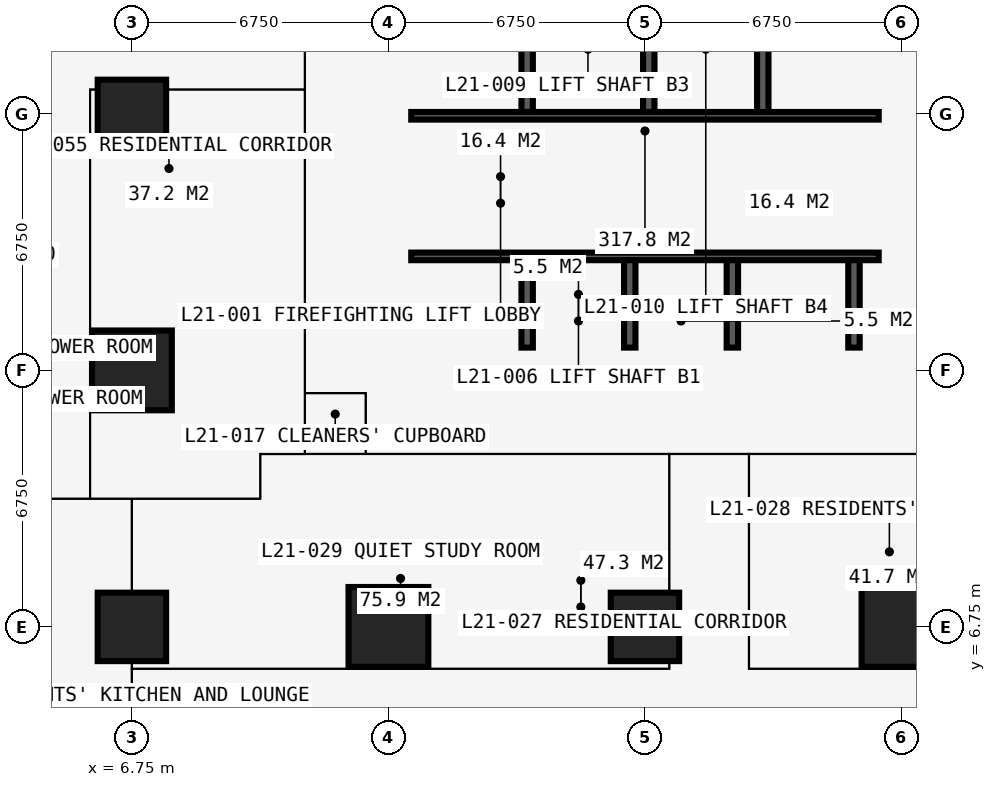
"""IFC4 building model, lengths in metres.
Left out: names, types, materials, properties, quantities, classifications, styles, units other than length and angle.
Written with IfcOpenShell. Run it as: python <this file> out.ifc"""

import sys

from ifc_helpers import new_model, si_unit, direction, frame, frame_2d, origin, origin_2d, place, context, subcontext, project, spatial, rectangle, extrude, element, fill, save


model = new_model("IFC4")
c1 = context("Model", 3, precision=1e-05, world=origin(), true_north=direction((0.0, 1.0)))
c2 = subcontext(c1, "Body", "Model", "MODEL_VIEW")
j1 = project(units=[si_unit("LENGTHUNIT", "METRE"), si_unit("PLANEANGLEUNIT", "RADIAN")], contexts=[c1])
p1 = place(None, origin())
s1 = spatial("IfcSite", under=j1, at=p1, CompositionType="ELEMENT")
p2 = place(p1, origin())
s2 = spatial("IfcBuilding", under=s1, at=p2, CompositionType="ELEMENT")
p3 = place(p2, frame((0.0, 0.0, 80.1)))
s3 = spatial("IfcBuildingStorey", under=s2, at=p3, CompositionType="ELEMENT", Elevation=80.1)
p4 = place(p3, frame((6.75, 6.75, 0.0), z_axis=(0.0, 0.0, 1.0), x_axis=(1.0, 0.0, 0.0)))
e1 = element("IfcColumn", 1, at=p4, inside=s3, PredefinedType="COLUMN", context=c2, shape_type="SweptSolid", body=[
    extrude(rectangle(XDim=1.8, YDim=1.8, at=origin_2d()), origin(), (0.0, 0.0, 1.0), 3.6),
])
p5 = place(p3, frame((6.75, 13.5, 0.0), z_axis=(0.0, 0.0, 1.0), x_axis=(1.0, 0.0, 0.0)))
e2 = element("IfcColumn", 2, at=p5, inside=s3, PredefinedType="COLUMN", context=c2, shape_type="SweptSolid", body=[
    extrude(rectangle(XDim=2.1, YDim=2.1, at=origin_2d()), origin(), (0.0, 0.0, 1.0), 3.6),
])
p6 = place(p3, frame((6.75, 20.25, 0.0), z_axis=(0.0, 0.0, 1.0), x_axis=(1.0, 0.0, 0.0)))
e3 = element("IfcColumn", 3, at=p6, inside=s3, PredefinedType="COLUMN", context=c2, shape_type="SweptSolid", body=[
    extrude(rectangle(XDim=1.8, YDim=1.8, at=origin_2d()), origin(), (0.0, 0.0, 1.0), 3.6),
])
p7 = place(p3, frame((13.5, 6.75, 0.0), z_axis=(0.0, 0.0, 1.0), x_axis=(1.0, 0.0, 0.0)))
e4 = element("IfcColumn", 4, at=p7, inside=s3, PredefinedType="COLUMN", context=c2, shape_type="SweptSolid", body=[
    extrude(rectangle(XDim=2.1, YDim=2.1, at=origin_2d()), origin(), (0.0, 0.0, 1.0), 3.6),
])
p8 = place(p3, frame((20.25, 6.75, 0.0), z_axis=(0.0, 0.0, 1.0), x_axis=(1.0, 0.0, 0.0)))
e5 = element("IfcColumn", 5, at=p8, inside=s3, PredefinedType="COLUMN", context=c2, shape_type="SweptSolid", body=[
    extrude(rectangle(XDim=1.8, YDim=1.8, at=origin_2d()), origin(), (0.0, 0.0, 1.0), 3.6),
])
p9 = place(p3, frame((27.0, 6.75, 0.0), z_axis=(0.0, 0.0, 1.0), x_axis=(1.0, 0.0, 0.0)))
e6 = element("IfcColumn", 6, at=p9, inside=s3, PredefinedType="COLUMN", context=c2, shape_type="SweptSolid", body=[
    extrude(rectangle(XDim=2.1, YDim=2.1, at=origin_2d()), origin(), (0.0, 0.0, 1.0), 3.6),
])
p10 = place(p3, frame((12.9, 13.5, 0.0), z_axis=(0.0, 0.0, 1.0), x_axis=(1.0, 0.0, 0.0)))
e7 = element("IfcWall", 7, at=p10, inside=s3, PredefinedType="SHEAR", context=c2, shape_type="SweptSolid", body=[
    extrude(rectangle(XDim=14.7, YDim=1.2, at=frame_2d((7.35, 0.0))), origin(), (0.0, 0.0, 1.0), 3.6),
])
p11 = place(p3, frame((27.0, 14.1, 0.0), z_axis=(0.0, 0.0, 1.0), x_axis=(0.0, 1.0, 0.0)))
e8 = element("IfcWall", 8, at=p11, inside=s3, PredefinedType="SHEAR", context=c2, shape_type="SweptSolid", body=[
    extrude(rectangle(XDim=12.3, YDim=1.2, at=frame_2d((6.15, 0.0))), origin(), (0.0, 0.0, 1.0), 3.6),
])
p12 = place(p11, frame((3.65, 0.0, 0.0)))
e9 = element("IfcOpeningElement", 9, at=p12, cuts=e8, PredefinedType="OPENING", context=c2, shape_type="SweptSolid", body=[
    extrude(rectangle(XDim=1.2, YDim=2.2, at=frame_2d((0.6, 1.1))), frame((0.0, 0.61, 0.0), z_axis=(0.0, -1.0, 0.0), x_axis=(1.0, 0.0, 0.0)), (0.0, 0.0, 1.0), 1.22),
])
p13 = place(p3, frame((13.5, 26.4, 0.0), z_axis=(0.0, 0.0, 1.0), x_axis=(0.0, -1.0, 0.0)))
e10 = element("IfcWall", 10, at=p13, inside=s3, PredefinedType="SHEAR", context=c2, shape_type="SweptSolid", body=[
    extrude(rectangle(XDim=12.3, YDim=1.2, at=frame_2d((6.15, 0.0))), origin(), (0.0, 0.0, 1.0), 3.6),
])
p14 = place(p13, frame((7.45, 0.0, 0.0)))
e11 = element("IfcOpeningElement", 11, at=p14, cuts=e10, PredefinedType="OPENING", context=c2, shape_type="SweptSolid", body=[
    extrude(rectangle(XDim=1.2, YDim=2.2, at=frame_2d((0.6, 1.1))), frame((0.0, 0.61, 0.0), z_axis=(0.0, -1.0, 0.0), x_axis=(1.0, 0.0, 0.0)), (0.0, 0.0, 1.0), 1.22),
])
p15 = place(p3, frame((14.1, 16.5, 0.0), z_axis=(0.0, 0.0, 1.0), x_axis=(1.0, 0.0, 0.0)))
e12 = element("IfcWall", 12, at=p15, inside=s3, PredefinedType="SHEAR", context=c2, shape_type="SweptSolid", body=[
    extrude(rectangle(XDim=12.3, YDim=0.2, at=frame_2d((6.15, 0.0))), origin(), (0.0, 0.0, 1.0), 3.6),
])
p16 = place(p15, frame((0.9, 0.0, 0.0)))
e13 = element("IfcOpeningElement", 13, at=p16, cuts=e12, PredefinedType="OPENING", context=c2, shape_type="SweptSolid", body=[
    extrude(rectangle(XDim=1.1, YDim=2.2, at=frame_2d((0.55, 1.1))), frame((0.0, 0.11, 0.0), z_axis=(0.0, -1.0, 0.0), x_axis=(1.0, 0.0, 0.0)), (0.0, 0.0, 1.0), 0.22),
])
p17 = place(p15, frame((9.5, 0.0, 0.0)))
e14 = element("IfcOpeningElement", 14, at=p17, cuts=e12, PredefinedType="OPENING", context=c2, shape_type="SweptSolid", body=[
    extrude(rectangle(XDim=1.1, YDim=2.2, at=frame_2d((0.55, 1.1))), frame((0.0, 0.11, 0.0), z_axis=(0.0, -1.0, 0.0), x_axis=(1.0, 0.0, 0.0)), (0.0, 0.0, 1.0), 0.22),
])
p18 = place(p3, frame((14.1, 20.2, 0.0), z_axis=(0.0, 0.0, 1.0), x_axis=(1.0, 0.0, 0.0)))
e15 = element("IfcWall", 15, at=p18, inside=s3, PredefinedType="SHEAR", context=c2, shape_type="SweptSolid", body=[
    extrude(rectangle(XDim=12.3, YDim=0.2, at=frame_2d((6.15, 0.0))), origin(), (0.0, 0.0, 1.0), 3.6),
])
p19 = place(p18, frame((0.35, 0.0, 0.0)))
e16 = element("IfcOpeningElement", 16, at=p19, cuts=e15, PredefinedType="OPENING", context=c2, shape_type="SweptSolid", body=[
    extrude(rectangle(XDim=1.1, YDim=2.2, at=frame_2d((0.55, 1.1))), frame((0.0, 0.11, 0.0), z_axis=(0.0, -1.0, 0.0), x_axis=(1.0, 0.0, 0.0)), (0.0, 0.0, 1.0), 0.22),
])
p20 = place(p18, frame((9.75, 0.0, 0.0)))
e17 = element("IfcOpeningElement", 17, at=p20, cuts=e15, PredefinedType="OPENING", context=c2, shape_type="SweptSolid", body=[
    extrude(rectangle(XDim=1.1, YDim=2.2, at=frame_2d((0.55, 1.1))), frame((0.0, 0.11, 0.0), z_axis=(0.0, -1.0, 0.0), x_axis=(1.0, 0.0, 0.0)), (0.0, 0.0, 1.0), 0.22),
])
for number, where, z_axis, x_axis in (
    (18, (17.15, 20.3, 0.0), (0.0, 0.0, 1.0), (0.0, 1.0, 0.0)),
    (19, (23.35, 20.3, 0.0), (0.0, 0.0, 1.0), (0.0, 1.0, 0.0)),
):
    element("IfcWall", number, at=place(p3, frame(where, z_axis=z_axis, x_axis=x_axis)), inside=s3, PredefinedType="SHEAR", context=c2, shape_type="SweptSolid", body=[
        extrude(rectangle(XDim=6.1, YDim=0.3, at=frame_2d((3.05, 0.0))), origin(), (0.0, 0.0, 1.0), 3.6),
    ])
p21 = place(p3, frame((20.35, 20.3, 0.0), z_axis=(0.0, 0.0, 1.0), x_axis=(0.0, 1.0, 0.0)))
e20 = element("IfcWall", 20, at=p21, inside=s3, PredefinedType="SHEAR", context=c2, shape_type="SweptSolid", body=[
    extrude(rectangle(XDim=2.8, YDim=0.3, at=frame_2d((1.4, 0.0))), origin(), (0.0, 0.0, 1.0), 3.6),
])
for number, where, z_axis, x_axis in (
    (21, (17.15, 14.1, 0.0), (0.0, 0.0, 1.0), (0.0, 1.0, 0.0)),
    (22, (19.85, 14.1, 0.0), (0.0, 0.0, 1.0), (0.0, 1.0, 0.0)),
    (23, (22.55, 14.1, 0.0), (0.0, 0.0, 1.0), (0.0, 1.0, 0.0)),
    (24, (25.75, 14.1, 0.0), (0.0, 0.0, 1.0), (0.0, 1.0, 0.0)),
):
    element("IfcWall", number, at=place(p3, frame(where, z_axis=z_axis, x_axis=x_axis)), inside=s3, PredefinedType="SHEAR", context=c2, shape_type="SweptSolid", body=[
        extrude(rectangle(XDim=2.3, YDim=0.3, at=frame_2d((1.15, 0.0))), origin(), (0.0, 0.0, 1.0), 3.6),
    ])
p22 = place(p3, frame((18.875, 16.6, 0.0), z_axis=(0.0, 0.0, 1.0), x_axis=(0.0, 1.0, 0.0)))
e25 = element("IfcWall", 25, at=p22, inside=s3, PredefinedType="PARTITIONING", context=c2, shape_type="SweptSolid", body=[
    extrude(rectangle(XDim=3.5, YDim=0.15, at=frame_2d((1.75, 0.0))), origin(), (0.0, 0.0, 1.0), 3.375),
])
p23 = place(p22, frame((1.15, 0.0, 0.0)))
e26 = element("IfcOpeningElement", 26, at=p23, cuts=e25, PredefinedType="OPENING", context=c2, shape_type="SweptSolid", body=[
    extrude(rectangle(XDim=1.2, YDim=2.2, at=frame_2d((0.6, 1.1))), frame((0.0, 0.085, 0.0), z_axis=(0.0, -1.0, 0.0), x_axis=(1.0, 0.0, 0.0)), (0.0, 0.0, 1.0), 0.17),
])
p24 = place(p3, frame((21.625, 16.6, 0.0), z_axis=(0.0, 0.0, 1.0), x_axis=(0.0, 1.0, 0.0)))
e27 = element("IfcWall", 27, at=p24, inside=s3, PredefinedType="PARTITIONING", context=c2, shape_type="SweptSolid", body=[
    extrude(rectangle(XDim=3.5, YDim=0.15, at=frame_2d((1.75, 0.0))), origin(), (0.0, 0.0, 1.0), 3.375),
])
p25 = place(p24, frame((1.15, 0.0, 0.0)))
e28 = element("IfcOpeningElement", 28, at=p25, cuts=e27, PredefinedType="OPENING", context=c2, shape_type="SweptSolid", body=[
    extrude(rectangle(XDim=1.2, YDim=2.2, at=frame_2d((0.6, 1.1))), frame((0.0, 0.085, 0.0), z_axis=(0.0, -1.0, 0.0), x_axis=(1.0, 0.0, 0.0)), (0.0, 0.0, 1.0), 0.17),
])
p26 = place(p3, frame((20.38, 16.6, 0.0), z_axis=(0.0, 0.0, 1.0), x_axis=(0.0, 1.0, 0.0)))
e29 = element("IfcWall", 29, at=p26, inside=s3, PredefinedType="PARTITIONING", context=c2, shape_type="SweptSolid", body=[
    extrude(rectangle(XDim=3.5, YDim=0.15, at=frame_2d((1.75, 0.0))), origin(), (0.0, 0.0, 1.0), 3.375),
])
p27 = place(p3, frame((-0.734, 10.125, 0.0), z_axis=(0.0, 0.0, 1.0), x_axis=(1.0, 0.0, 0.0)))
e30 = element("IfcWall", 30, at=p27, inside=s3, PredefinedType="PARTITIONING", context=c2, shape_type="SweptSolid", body=[
    extrude(rectangle(XDim=10.859, YDim=0.15, at=frame_2d((5.429, 0.0))), origin(), (0.0, 0.0, 1.0), 3.375),
])
p28 = place(p3, frame((5.65, 10.125, 0.0), z_axis=(0.0, 0.0, 1.0), x_axis=(0.0, 1.0, 0.0)))
e31 = element("IfcWall", 31, at=p28, inside=s3, PredefinedType="PARTITIONING", context=c2, shape_type="SweptSolid", body=[
    extrude(rectangle(XDim=10.762, YDim=0.15, at=frame_2d((5.381, 0.0))), origin(), (0.0, 0.0, 1.0), 3.375),
])
p29 = place(p28, frame((4.9, 0.0, 0.0)))
e32 = element("IfcOpeningElement", 32, at=p29, cuts=e31, PredefinedType="OPENING", context=c2, shape_type="SweptSolid", body=[
    extrude(rectangle(XDim=0.95, YDim=2.2, at=frame_2d((0.475, 1.1))), frame((0.0, 0.085, 0.0), z_axis=(0.0, -1.0, 0.0), x_axis=(1.0, 0.0, 0.0)), (0.0, 0.0, 1.0), 0.17),
])
p30 = place(p3, frame((5.65, 20.887, 0.0), z_axis=(0.0, 0.0, 1.0), x_axis=(1.0, 0.0, 0.0)))
e33 = element("IfcWall", 33, at=p30, inside=s3, PredefinedType="PARTITIONING", context=c2, shape_type="SweptSolid", body=[
    extrude(rectangle(XDim=5.65, YDim=0.15, at=frame_2d((2.825, 0.0))), origin(), (0.0, 0.0, 1.0), 3.375),
])
p31 = place(p3, frame((6.75, 4.15, 0.0), z_axis=(0.0, 0.0, 1.0), x_axis=(0.0, 1.0, 0.0)))
e34 = element("IfcWall", 34, at=p31, inside=s3, PredefinedType="PARTITIONING", context=c2, shape_type="SweptSolid", body=[
    extrude(rectangle(XDim=5.975, YDim=0.15, at=frame_2d((2.988, 0.0))), origin(), (0.0, 0.0, 1.0), 2.877),
])
p32 = place(p3, frame((6.75, 5.65, 0.0), z_axis=(0.0, 0.0, 1.0), x_axis=(1.0, 0.0, 0.0)))
e35 = element("IfcWall", 35, at=p32, inside=s3, PredefinedType="PARTITIONING", context=c2, shape_type="SweptSolid", body=[
    extrude(rectangle(XDim=14.137, YDim=0.15, at=frame_2d((7.069, 0.0))), origin(), (0.0, 0.0, 1.0), 3.375),
])
p33 = place(p32, frame((7.85, 0.0, 0.0)))
e36 = element("IfcOpeningElement", 36, at=p33, cuts=e35, PredefinedType="OPENING", context=c2, shape_type="SweptSolid", body=[
    extrude(rectangle(XDim=0.95, YDim=2.2, at=frame_2d((0.475, 1.1))), frame((0.0, 0.085, 0.0), z_axis=(0.0, -1.0, 0.0), x_axis=(1.0, 0.0, 0.0)), (0.0, 0.0, 1.0), 0.17),
])
p34 = place(p3, frame((10.125, 10.125, 0.0), z_axis=(0.0, 0.0, 1.0), x_axis=(0.0, 1.0, 0.0)))
e37 = element("IfcWall", 37, at=p34, inside=s3, PredefinedType="PARTITIONING", context=c2, shape_type="SweptSolid", body=[
    extrude(rectangle(XDim=1.175, YDim=0.15, at=frame_2d((0.587, 0.0))), origin(), (0.0, 0.0, 1.0), 3.375),
])
p35 = place(p3, frame((10.125, 11.3, 0.0), z_axis=(0.0, 0.0, 1.0), x_axis=(1.0, 0.0, 0.0)))
e38 = element("IfcWall", 38, at=p35, inside=s3, PredefinedType="PARTITIONING", context=c2, shape_type="SweptSolid", body=[
    extrude(rectangle(XDim=20.675, YDim=0.15, at=frame_2d((10.337, 0.0))), origin(), (0.0, 0.0, 1.0), 3.375),
])
p36 = place(p35, frame((11.312, 0.0, 0.0)))
e39 = element("IfcOpeningElement", 39, at=p36, cuts=e38, PredefinedType="OPENING", context=c2, shape_type="SweptSolid", body=[
    extrude(rectangle(XDim=1.0, YDim=2.2, at=frame_2d((0.5, 1.1))), frame((0.0, 0.085, 0.0), z_axis=(0.0, -1.0, 0.0), x_axis=(1.0, 0.0, 0.0)), (0.0, 0.0, 1.0), 0.17),
])
p37 = place(p3, frame((11.3, 11.3, 0.0), z_axis=(0.0, 0.0, 1.0), x_axis=(0.0, 1.0, 0.0)))
e40 = element("IfcWall", 40, at=p37, inside=s3, PredefinedType="PARTITIONING", context=c2, shape_type="SweptSolid", body=[
    extrude(rectangle(XDim=19.3, YDim=0.15, at=frame_2d((9.65, 0.0))), origin(), (0.0, 0.0, 1.0), 3.375),
])
p38 = place(p37, frame((18.1, 0.0, 0.0)))
e41 = element("IfcOpeningElement", 41, at=p38, cuts=e40, PredefinedType="OPENING", context=c2, shape_type="SweptSolid", body=[
    extrude(rectangle(XDim=1.0, YDim=2.2, at=frame_2d((0.5, 1.1))), frame((0.0, 0.085, 0.0), z_axis=(0.0, -1.0, 0.0), x_axis=(1.0, 0.0, 0.0)), (0.0, 0.0, 1.0), 0.17),
])
p39 = place(p37, frame((10.137, 0.0, 0.0)))
e42 = element("IfcOpeningElement", 42, at=p39, cuts=e40, PredefinedType="OPENING", context=c2, shape_type="SweptSolid", body=[
    extrude(rectangle(XDim=1.0, YDim=2.2, at=frame_2d((0.5, 1.1))), frame((0.0, 0.085, 0.0), z_axis=(0.0, -1.0, 0.0), x_axis=(1.0, 0.0, 0.0)), (0.0, 0.0, 1.0), 0.17),
])
p40 = place(p3, frame((11.3, 12.9, 0.0), z_axis=(0.0, 0.0, 1.0), x_axis=(1.0, 0.0, 0.0)))
e43 = element("IfcWall", 43, at=p40, inside=s3, PredefinedType="PARTITIONING", context=c2, shape_type="SweptSolid", body=[
    extrude(rectangle(XDim=1.6, YDim=0.15, at=frame_2d((0.8, 0.0))), origin(), (0.0, 0.0, 1.0), 2.806),
])
p41 = place(p40, frame((0.3, 0.0, 0.0)))
e44 = element("IfcOpeningElement", 44, at=p41, cuts=e43, PredefinedType="OPENING", context=c2, shape_type="SweptSolid", body=[
    extrude(rectangle(XDim=0.95, YDim=2.2, at=frame_2d((0.475, 1.1))), frame((0.0, 0.085, 0.0), z_axis=(0.0, -1.0, 0.0), x_axis=(1.0, 0.0, 0.0)), (0.0, 0.0, 1.0), 0.17),
])
p42 = place(p3, frame((12.9, 11.3, 0.0), z_axis=(0.0, 0.0, 1.0), x_axis=(0.0, 1.0, 0.0)))
e45 = element("IfcWall", 45, at=p42, inside=s3, PredefinedType="PARTITIONING", context=c2, shape_type="SweptSolid", body=[
    extrude(rectangle(XDim=1.6, YDim=0.15, at=frame_2d((0.8, 0.0))), origin(), (0.0, 0.0, 1.0), 3.375),
])
p43 = place(p3, frame((20.887, 5.65, 0.0), z_axis=(0.0, 0.0, 1.0), x_axis=(0.0, 1.0, 0.0)))
e46 = element("IfcWall", 46, at=p43, inside=s3, PredefinedType="PARTITIONING", context=c2, shape_type="SweptSolid", body=[
    extrude(rectangle(XDim=5.65, YDim=0.15, at=frame_2d((2.825, 0.0))), origin(), (0.0, 0.0, 1.0), 3.375),
])
p44 = place(p3, frame((22.988, 5.65, 0.0), z_axis=(0.0, 0.0, 1.0), x_axis=(1.0, 0.0, 0.0)))
e47 = element("IfcWall", 47, at=p44, inside=s3, PredefinedType="PARTITIONING", context=c2, shape_type="SweptSolid", body=[
    extrude(rectangle(XDim=7.387, YDim=0.15, at=frame_2d((3.694, 0.0))), origin(), (0.0, 0.0, 1.0), 3.375),
])
p45 = place(p44, frame((2.0, 0.0, 0.0)))
e48 = element("IfcOpeningElement", 48, at=p45, cuts=e47, PredefinedType="OPENING", context=c2, shape_type="SweptSolid", body=[
    extrude(rectangle(XDim=0.95, YDim=2.2, at=frame_2d((0.475, 1.1))), frame((0.0, 0.085, 0.0), z_axis=(0.0, -1.0, 0.0), x_axis=(1.0, 0.0, 0.0)), (0.0, 0.0, 1.0), 0.17),
])
p46 = place(p3, frame((22.988, 5.65, 0.0), z_axis=(0.0, 0.0, 1.0), x_axis=(0.0, 1.0, 0.0)))
e49 = element("IfcWall", 49, at=p46, inside=s3, PredefinedType="PARTITIONING", context=c2, shape_type="SweptSolid", body=[
    extrude(rectangle(XDim=5.65, YDim=0.15, at=frame_2d((2.825, 0.0))), origin(), (0.0, 0.0, 1.0), 3.375),
])
p47 = place(p16, origin())
e50 = element("IfcDoor", 50, at=p47, inside=s3, OperationType="DOUBLE_DOOR_SLIDING", PredefinedType="DOOR", context=c2, shape_type="SweptSolid", body=[
    extrude(rectangle(XDim=1.1, YDim=2.2, at=frame_2d((0.55, 1.1))), frame((0.0, 0.025, 0.0), z_axis=(0.0, -1.0, 0.0), x_axis=(1.0, 0.0, 0.0)), (0.0, 0.0, 1.0), 0.05),
])
fill(e13, e50)
p48 = place(p17, origin())
e51 = element("IfcDoor", 51, at=p48, inside=s3, OperationType="DOUBLE_DOOR_SLIDING", PredefinedType="DOOR", context=c2, shape_type="SweptSolid", body=[
    extrude(rectangle(XDim=1.1, YDim=2.2, at=frame_2d((0.55, 1.1))), frame((0.0, 0.025, 0.0), z_axis=(0.0, -1.0, 0.0), x_axis=(1.0, 0.0, 0.0)), (0.0, 0.0, 1.0), 0.05),
])
fill(e14, e51)
p49 = place(p14, origin())
e52 = element("IfcDoor", 52, at=p49, inside=s3, OperationType="DOUBLE_DOOR_SINGLE_SWING", PredefinedType="DOOR", context=c2, shape_type="SweptSolid", body=[
    extrude(rectangle(XDim=1.2, YDim=2.2, at=frame_2d((0.6, 1.1))), frame((0.0, 0.025, 0.0), z_axis=(0.0, -1.0, 0.0), x_axis=(1.0, 0.0, 0.0)), (0.0, 0.0, 1.0), 0.05),
])
fill(e11, e52)
p50 = place(p12, origin())
e53 = element("IfcDoor", 53, at=p50, inside=s3, OperationType="DOUBLE_DOOR_SINGLE_SWING", PredefinedType="DOOR", context=c2, shape_type="SweptSolid", body=[
    extrude(rectangle(XDim=1.2, YDim=2.2, at=frame_2d((0.6, 1.1))), frame((0.0, 0.025, 0.0), z_axis=(0.0, -1.0, 0.0), x_axis=(1.0, 0.0, 0.0)), (0.0, 0.0, 1.0), 0.05),
])
fill(e9, e53)
p51 = place(p23, origin())
e54 = element("IfcDoor", 54, at=p51, inside=s3, OperationType="DOUBLE_DOOR_SINGLE_SWING", PredefinedType="DOOR", context=c2, shape_type="SweptSolid", body=[
    extrude(rectangle(XDim=1.2, YDim=2.2, at=frame_2d((0.6, 1.1))), frame((0.0, 0.025, 0.0), z_axis=(0.0, -1.0, 0.0), x_axis=(1.0, 0.0, 0.0)), (0.0, 0.0, 1.0), 0.05),
])
fill(e26, e54)
p52 = place(p25, origin())
e55 = element("IfcDoor", 55, at=p52, inside=s3, OperationType="DOUBLE_DOOR_SINGLE_SWING", PredefinedType="DOOR", context=c2, shape_type="SweptSolid", body=[
    extrude(rectangle(XDim=1.2, YDim=2.2, at=frame_2d((0.6, 1.1))), frame((0.0, 0.025, 0.0), z_axis=(0.0, -1.0, 0.0), x_axis=(1.0, 0.0, 0.0)), (0.0, 0.0, 1.0), 0.05),
])
fill(e28, e55)
p53 = place(p19, origin())
e56 = element("IfcDoor", 56, at=p53, inside=s3, OperationType="SINGLE_SWING_LEFT", PredefinedType="DOOR", context=c2, shape_type="SweptSolid", body=[
    extrude(rectangle(XDim=1.1, YDim=2.2, at=frame_2d((0.55, 1.1))), frame((0.0, 0.025, 0.0), z_axis=(0.0, -1.0, 0.0), x_axis=(1.0, 0.0, 0.0)), (0.0, 0.0, 1.0), 0.05),
])
fill(e16, e56)
p54 = place(p20, origin())
e57 = element("IfcDoor", 57, at=p54, inside=s3, OperationType="SINGLE_SWING_LEFT", PredefinedType="DOOR", context=c2, shape_type="SweptSolid", body=[
    extrude(rectangle(XDim=1.1, YDim=2.2, at=frame_2d((0.55, 1.1))), frame((0.0, 0.025, 0.0), z_axis=(0.0, -1.0, 0.0), x_axis=(1.0, 0.0, 0.0)), (0.0, 0.0, 1.0), 0.05),
])
fill(e17, e57)
p55 = place(p41, origin())
e58 = element("IfcDoor", 58, at=p55, inside=s3, OperationType="SINGLE_SWING_LEFT", PredefinedType="DOOR", context=c2, shape_type="SweptSolid", body=[
    extrude(rectangle(XDim=0.95, YDim=2.2, at=frame_2d((0.475, 1.1))), frame((0.0, 0.025, 0.0), z_axis=(0.0, -1.0, 0.0), x_axis=(1.0, 0.0, 0.0)), (0.0, 0.0, 1.0), 0.05),
])
fill(e44, e58)
p56 = place(p36, origin())
e59 = element("IfcDoor", 59, at=p56, inside=s3, OperationType="SINGLE_SWING_LEFT", PredefinedType="DOOR", context=c2, shape_type="SweptSolid", body=[
    extrude(rectangle(XDim=1.0, YDim=2.2, at=frame_2d((0.5, 1.1))), frame((0.0, 0.025, 0.0), z_axis=(0.0, -1.0, 0.0), x_axis=(1.0, 0.0, 0.0)), (0.0, 0.0, 1.0), 0.05),
])
fill(e39, e59)
p57 = place(p45, origin())
e60 = element("IfcDoor", 60, at=p57, inside=s3, OperationType="SINGLE_SWING_LEFT", PredefinedType="DOOR", context=c2, shape_type="SweptSolid", body=[
    extrude(rectangle(XDim=0.95, YDim=2.2, at=frame_2d((0.475, 1.1))), frame((0.0, 0.025, 0.0), z_axis=(0.0, -1.0, 0.0), x_axis=(1.0, 0.0, 0.0)), (0.0, 0.0, 1.0), 0.05),
])
fill(e48, e60)
p58 = place(p33, origin())
e61 = element("IfcDoor", 61, at=p58, inside=s3, OperationType="SINGLE_SWING_LEFT", PredefinedType="DOOR", context=c2, shape_type="SweptSolid", body=[
    extrude(rectangle(XDim=0.95, YDim=2.2, at=frame_2d((0.475, 1.1))), frame((0.0, 0.025, 0.0), z_axis=(0.0, -1.0, 0.0), x_axis=(1.0, 0.0, 0.0)), (0.0, 0.0, 1.0), 0.05),
])
fill(e36, e61)
p59 = place(p39, origin())
e62 = element("IfcDoor", 62, at=p59, inside=s3, OperationType="SINGLE_SWING_LEFT", PredefinedType="DOOR", context=c2, shape_type="SweptSolid", body=[
    extrude(rectangle(XDim=1.0, YDim=2.2, at=frame_2d((0.5, 1.1))), frame((0.0, 0.025, 0.0), z_axis=(0.0, -1.0, 0.0), x_axis=(1.0, 0.0, 0.0)), (0.0, 0.0, 1.0), 0.05),
])
fill(e42, e62)
p60 = place(p29, origin())
e63 = element("IfcDoor", 63, at=p60, inside=s3, OperationType="SINGLE_SWING_LEFT", PredefinedType="DOOR", context=c2, shape_type="SweptSolid", body=[
    extrude(rectangle(XDim=0.95, YDim=2.2, at=frame_2d((0.475, 1.1))), frame((0.0, 0.025, 0.0), z_axis=(0.0, -1.0, 0.0), x_axis=(1.0, 0.0, 0.0)), (0.0, 0.0, 1.0), 0.05),
])
fill(e32, e63)
save(model, sys.argv[1])
